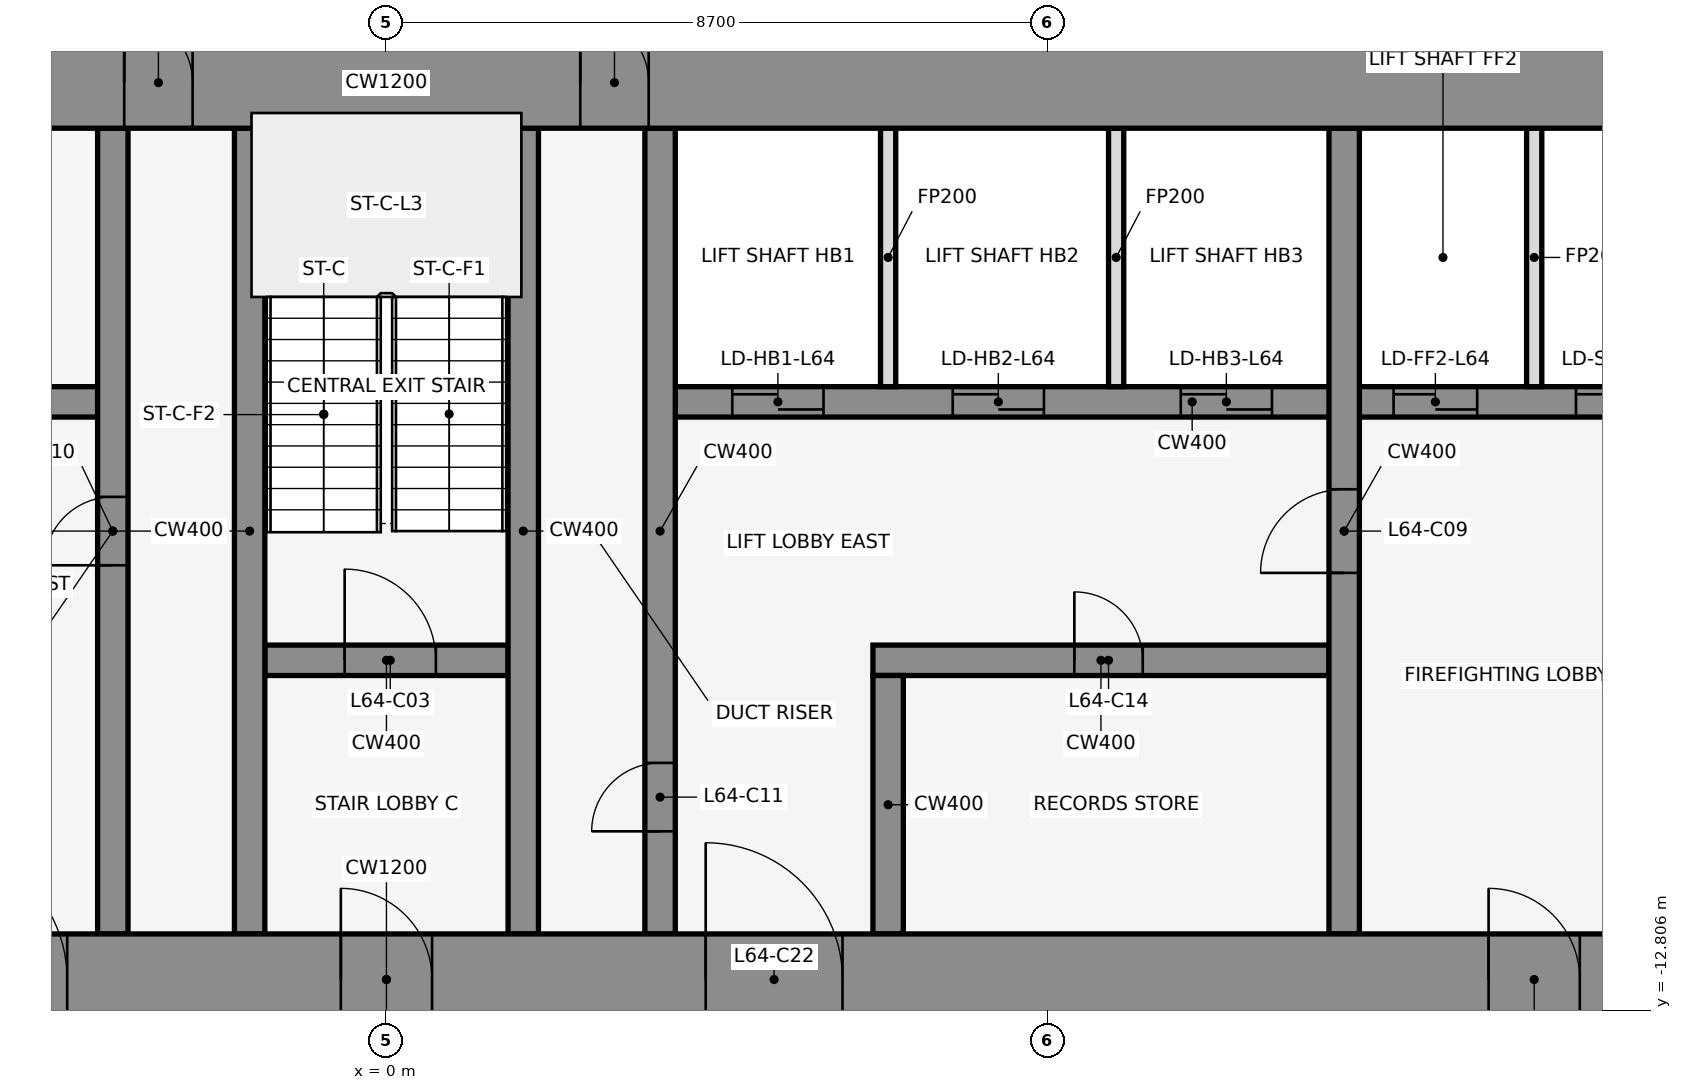
"""IFC4 building model, lengths in metres.
Left out: names, types, materials, properties, quantities, classifications, styles, units other than length and angle.
Written with IfcOpenShell. Run it as: python <this file> out.ifc"""

import sys

from ifc_helpers import new_model, si_unit, direction, frame, frame_2d, origin, place, context, subcontext, project, spatial, rectangle, extrude, element, fill, save


model = new_model("IFC4")
c1 = context("Model", 3, precision=1e-05, world=origin(), true_north=direction((0.0, 1.0)))
c2 = subcontext(c1, "Body", "Model", "MODEL_VIEW")
j1 = project(units=[si_unit("LENGTHUNIT", "METRE"), si_unit("PLANEANGLEUNIT", "RADIAN")], contexts=[c1])
p1 = place(None, origin())
s1 = spatial("IfcSite", under=j1, at=p1, CompositionType="ELEMENT")
p2 = place(p1, origin())
s2 = spatial("IfcBuilding", under=s1, at=p2, CompositionType="ELEMENT")
p3 = place(p2, frame((0.0, 0.0, 283.4)))
s3 = spatial("IfcBuildingStorey", under=s2, at=p3, CompositionType="ELEMENT", Elevation=283.4)
for number, where, z_axis, x_axis in (
    (1, (16.432, -0.105, 0.0), (0.0, 0.0, 1.0), (-0.84, 0.543, 0.0)),
    (2, (1.901, 1.08, 0.0), (0.0, 0.0, 1.0), (-0.84, -0.543, 0.0)),
    (3, (-0.068, -0.105, 0.0), (0.0, 0.0, 1.0), (-0.84, 0.543, 0.0)),
):
    element("IfcWall", number, at=place(p3, frame(where, z_axis=z_axis, x_axis=x_axis)), inside=s3, PredefinedType="STANDARD", context=c2, shape_type="SweptSolid", body=[
        extrude(rectangle(XDim=2.183, YDim=0.25, at=frame_2d((1.091, 0.0))), origin(), (0.0, 0.0, 1.0), 4.0),
    ])
p4 = place(p3, frame((-1.6, -8.2, 0.0), z_axis=(0.0, 0.0, 1.0), x_axis=(1.0, 0.0, 0.0)))
e4 = element("IfcWall", 4, at=p4, inside=s3, PredefinedType="SHEAR", context=c2, shape_type="SweptSolid", body=[
    extrude(rectangle(XDim=3.2, YDim=0.4, at=frame_2d((1.6, 0.0))), origin(), (0.0, 0.0, 1.0), 4.2),
])
p5 = place(p4, frame((1.05, 0.0, 0.0)))
e5 = element("IfcOpeningElement", 5, at=p5, cuts=e4, PredefinedType="OPENING", context=c2, shape_type="SweptSolid", body=[
    extrude(rectangle(XDim=1.2, YDim=2.1, at=frame_2d((0.6, 1.05))), frame((0.0, 0.212, 0.0), z_axis=(0.0, -1.0, 0.0), x_axis=(1.0, 0.0, 0.0)), (0.0, 0.0, 1.0), 0.424),
])
p6 = place(p3, frame((6.4, -8.2, 0.0), z_axis=(0.0, 0.0, 1.0), x_axis=(1.0, 0.0, 0.0)))
e6 = element("IfcWall", 6, at=p6, inside=s3, PredefinedType="SHEAR", context=c2, shape_type="SweptSolid", body=[
    extrude(rectangle(XDim=6.0, YDim=0.4, at=frame_2d((3.0, 0.0))), origin(), (0.0, 0.0, 1.0), 4.2),
])
p7 = place(p6, frame((2.65, 0.0, 0.0)))
e7 = element("IfcOpeningElement", 7, at=p7, cuts=e6, PredefinedType="OPENING", context=c2, shape_type="SweptSolid", body=[
    extrude(rectangle(XDim=0.9, YDim=2.1, at=frame_2d((0.45, 1.05))), frame((0.0, 0.212, 0.0), z_axis=(0.0, -1.0, 0.0), x_axis=(1.0, 0.0, 0.0)), (0.0, 0.0, 1.0), 0.424),
])
p8 = place(p3, frame((-17.4, -4.8, 0.0), z_axis=(0.0, 0.0, 1.0), x_axis=(1.0, 0.0, 0.0)))
e8 = element("IfcWall", 8, at=p8, inside=s3, PredefinedType="SHEAR", context=c2, shape_type="SweptSolid", body=[
    extrude(rectangle(XDim=13.6, YDim=0.4, at=frame_2d((6.8, 0.0))), origin(), (0.0, 0.0, 1.0), 4.2),
])
p9 = place(p8, frame((0.65, 0.0, 0.0)))
e9 = element("IfcOpeningElement", 9, at=p9, cuts=e8, PredefinedType="OPENING", context=c2, shape_type="SweptSolid", body=[
    extrude(rectangle(XDim=1.1, YDim=2.1, at=frame_2d((0.55, 1.05))), frame((0.0, 0.212, 0.0), z_axis=(0.0, -1.0, 0.0), x_axis=(1.0, 0.0, 0.0)), (0.0, 0.0, 1.0), 0.424),
])
p10 = place(p8, frame((2.95, 0.0, 0.0)))
e10 = element("IfcOpeningElement", 10, at=p10, cuts=e8, PredefinedType="OPENING", context=c2, shape_type="SweptSolid", body=[
    extrude(rectangle(XDim=1.1, YDim=2.1, at=frame_2d((0.55, 1.05))), frame((0.0, 0.212, 0.0), z_axis=(0.0, -1.0, 0.0), x_axis=(1.0, 0.0, 0.0)), (0.0, 0.0, 1.0), 0.424),
])
p11 = place(p8, frame((8.75, 0.0, 0.0)))
e11 = element("IfcOpeningElement", 11, at=p11, cuts=e8, PredefinedType="OPENING", context=c2, shape_type="SweptSolid", body=[
    extrude(rectangle(XDim=0.9, YDim=2.1, at=frame_2d((0.45, 1.05))), frame((0.0, 0.212, 0.0), z_axis=(0.0, -1.0, 0.0), x_axis=(1.0, 0.0, 0.0)), (0.0, 0.0, 1.0), 0.424),
])
p12 = place(p3, frame((3.8, -4.8, 0.0), z_axis=(0.0, 0.0, 1.0), x_axis=(1.0, 0.0, 0.0)))
e12 = element("IfcWall", 12, at=p12, inside=s3, PredefinedType="SHEAR", context=c2, shape_type="SweptSolid", body=[
    extrude(rectangle(XDim=13.6, YDim=0.4, at=frame_2d((6.8, 0.0))), origin(), (0.0, 0.0, 1.0), 4.2),
])
p13 = place(p12, frame((0.75, 0.0, 0.0)))
e13 = element("IfcOpeningElement", 13, at=p13, cuts=e12, PredefinedType="OPENING", context=c2, shape_type="SweptSolid", body=[
    extrude(rectangle(XDim=1.2, YDim=2.1, at=frame_2d((0.6, 1.05))), frame((0.0, 0.212, 0.0), z_axis=(0.0, -1.0, 0.0), x_axis=(1.0, 0.0, 0.0)), (0.0, 0.0, 1.0), 0.424),
])
p14 = place(p12, frame((3.65, 0.0, 0.0)))
e14 = element("IfcOpeningElement", 14, at=p14, cuts=e12, PredefinedType="OPENING", context=c2, shape_type="SweptSolid", body=[
    extrude(rectangle(XDim=1.2, YDim=2.1, at=frame_2d((0.6, 1.05))), frame((0.0, 0.212, 0.0), z_axis=(0.0, -1.0, 0.0), x_axis=(1.0, 0.0, 0.0)), (0.0, 0.0, 1.0), 0.424),
])
p15 = place(p12, frame((6.65, 0.0, 0.0)))
e15 = element("IfcOpeningElement", 15, at=p15, cuts=e12, PredefinedType="OPENING", context=c2, shape_type="SweptSolid", body=[
    extrude(rectangle(XDim=1.2, YDim=2.1, at=frame_2d((0.6, 1.05))), frame((0.0, 0.212, 0.0), z_axis=(0.0, -1.0, 0.0), x_axis=(1.0, 0.0, 0.0)), (0.0, 0.0, 1.0), 0.424),
])
p16 = place(p12, frame((9.45, 0.0, 0.0)))
e16 = element("IfcOpeningElement", 16, at=p16, cuts=e12, PredefinedType="OPENING", context=c2, shape_type="SweptSolid", body=[
    extrude(rectangle(XDim=1.1, YDim=2.1, at=frame_2d((0.55, 1.05))), frame((0.0, 0.212, 0.0), z_axis=(0.0, -1.0, 0.0), x_axis=(1.0, 0.0, 0.0)), (0.0, 0.0, 1.0), 0.424),
])
p17 = place(p12, frame((11.85, 0.0, 0.0)))
e17 = element("IfcOpeningElement", 17, at=p17, cuts=e12, PredefinedType="OPENING", context=c2, shape_type="SweptSolid", body=[
    extrude(rectangle(XDim=1.1, YDim=2.1, at=frame_2d((0.55, 1.05))), frame((0.0, 0.212, 0.0), z_axis=(0.0, -1.0, 0.0), x_axis=(1.0, 0.0, 0.0)), (0.0, 0.0, 1.0), 0.424),
])
p18 = place(p3, frame((-3.6, -11.8, 0.0), z_axis=(0.0, 0.0, 1.0), x_axis=(0.0, 1.0, 0.0)))
e18 = element("IfcWall", 18, at=p18, inside=s3, PredefinedType="SHEAR", context=c2, shape_type="SweptSolid", body=[
    extrude(rectangle(XDim=10.6, YDim=0.4, at=frame_2d((5.3, 0.0))), origin(), (0.0, 0.0, 1.0), 4.2),
])
p19 = place(p18, frame((4.85, 0.0, 0.0)))
e19 = element("IfcOpeningElement", 19, at=p19, cuts=e18, PredefinedType="OPENING", context=c2, shape_type="SweptSolid", body=[
    extrude(rectangle(XDim=0.9, YDim=2.1, at=frame_2d((0.45, 1.05))), frame((0.0, 0.212, 0.0), z_axis=(0.0, -1.0, 0.0), x_axis=(1.0, 0.0, 0.0)), (0.0, 0.0, 1.0), 0.424),
])
for number, where, z_axis, x_axis in (
    (20, (-1.8, -11.8, 0.0), (0.0, 0.0, 1.0), (0.0, 1.0, 0.0)),
    (21, (1.8, -11.8, 0.0), (0.0, 0.0, 1.0), (0.0, 1.0, 0.0)),
):
    element("IfcWall", number, at=place(p3, frame(where, z_axis=z_axis, x_axis=x_axis)), inside=s3, PredefinedType="SHEAR", context=c2, shape_type="SweptSolid", body=[
        extrude(rectangle(XDim=10.6, YDim=0.4, at=frame_2d((5.3, 0.0))), origin(), (0.0, 0.0, 1.0), 4.2),
    ])
p20 = place(p3, frame((3.6, -11.8, 0.0), z_axis=(0.0, 0.0, 1.0), x_axis=(0.0, 1.0, 0.0)))
e22 = element("IfcWall", 22, at=p20, inside=s3, PredefinedType="SHEAR", context=c2, shape_type="SweptSolid", body=[
    extrude(rectangle(XDim=10.6, YDim=0.4, at=frame_2d((5.3, 0.0))), origin(), (0.0, 0.0, 1.0), 4.2),
])
p21 = place(p20, frame((1.35, 0.0, 0.0)))
e23 = element("IfcOpeningElement", 23, at=p21, cuts=e22, PredefinedType="OPENING", context=c2, shape_type="SweptSolid", body=[
    extrude(rectangle(XDim=0.9, YDim=2.1, at=frame_2d((0.45, 1.05))), frame((0.0, 0.212, 0.0), z_axis=(0.0, -1.0, 0.0), x_axis=(1.0, 0.0, 0.0)), (0.0, 0.0, 1.0), 0.424),
])
p22 = place(p3, frame((6.6, -11.8, 0.0), z_axis=(0.0, 0.0, 1.0), x_axis=(0.0, 1.0, 0.0)))
e24 = element("IfcWall", 24, at=p22, inside=s3, PredefinedType="SHEAR", context=c2, shape_type="SweptSolid", body=[
    extrude(rectangle(XDim=3.4, YDim=0.4, at=frame_2d((1.7, 0.0))), origin(), (0.0, 0.0, 1.0), 4.2),
])
for number, where, z_axis, x_axis in (
    (25, (6.6, -4.6, 0.0), (0.0, 0.0, 1.0), (0.0, 1.0, 0.0)),
    (26, (9.6, -4.6, 0.0), (0.0, 0.0, 1.0), (0.0, 1.0, 0.0)),
):
    element("IfcWall", number, at=place(p3, frame(where, z_axis=z_axis, x_axis=x_axis)), inside=s3, PredefinedType="PARTITIONING", context=c2, shape_type="SweptSolid", body=[
        extrude(rectangle(XDim=3.4, YDim=0.2, at=frame_2d((1.7, 0.0))), origin(), (0.0, 0.0, 1.0), 3.068),
    ])
p23 = place(p3, frame((12.6, -11.8, 0.0), z_axis=(0.0, 0.0, 1.0), x_axis=(0.0, 1.0, 0.0)))
e27 = element("IfcWall", 27, at=p23, inside=s3, PredefinedType="SHEAR", context=c2, shape_type="SweptSolid", body=[
    extrude(rectangle(XDim=10.6, YDim=0.4, at=frame_2d((5.3, 0.0))), origin(), (0.0, 0.0, 1.0), 4.2),
])
p24 = place(p23, frame((4.75, 0.0, 0.0)))
e28 = element("IfcOpeningElement", 28, at=p24, cuts=e27, PredefinedType="OPENING", context=c2, shape_type="SweptSolid", body=[
    extrude(rectangle(XDim=1.1, YDim=2.1, at=frame_2d((0.55, 1.05))), frame((0.0, 0.212, 0.0), z_axis=(0.0, -1.0, 0.0), x_axis=(1.0, 0.0, 0.0)), (0.0, 0.0, 1.0), 0.424),
])
p25 = place(p3, frame((15.1, -4.6, 0.0), z_axis=(0.0, 0.0, 1.0), x_axis=(0.0, 1.0, 0.0)))
e29 = element("IfcWall", 29, at=p25, inside=s3, PredefinedType="PARTITIONING", context=c2, shape_type="SweptSolid", body=[
    extrude(rectangle(XDim=3.4, YDim=0.2, at=frame_2d((1.7, 0.0))), origin(), (0.0, 0.0, 1.0), 3.068),
])
p26 = place(p3, frame((-22.0, -0.6, 0.0), z_axis=(0.0, 0.0, 1.0), x_axis=(1.0, 0.0, 0.0)))
e30 = element("IfcWall", 30, at=p26, inside=s3, PredefinedType="SHEAR", context=c2, shape_type="SweptSolid", body=[
    extrude(rectangle(XDim=44.0, YDim=1.2, at=frame_2d((22.0, 0.0))), origin(), (0.0, 0.0, 1.0), 4.2),
])
p27 = place(p26, frame((18.55, 0.0, 0.0)))
e31 = element("IfcOpeningElement", 31, at=p27, cuts=e30, PredefinedType="OPENING", context=c2, shape_type="SweptSolid", body=[
    extrude(rectangle(XDim=0.9, YDim=2.1, at=frame_2d((0.45, 1.05))), frame((0.0, 0.612, 0.0), z_axis=(0.0, -1.0, 0.0), x_axis=(1.0, 0.0, 0.0)), (0.0, 0.0, 1.0), 1.224),
])
p28 = place(p26, frame((24.55, 0.0, 0.0)))
e32 = element("IfcOpeningElement", 32, at=p28, cuts=e30, PredefinedType="OPENING", context=c2, shape_type="SweptSolid", body=[
    extrude(rectangle(XDim=0.9, YDim=2.1, at=frame_2d((0.45, 1.05))), frame((0.0, 0.612, 0.0), z_axis=(0.0, -1.0, 0.0), x_axis=(1.0, 0.0, 0.0)), (0.0, 0.0, 1.0), 1.224),
])
p29 = place(p3, frame((-22.0, -12.4, 0.0), z_axis=(0.0, 0.0, 1.0), x_axis=(1.0, 0.0, 0.0)))
e33 = element("IfcWall", 33, at=p29, inside=s3, PredefinedType="SHEAR", context=c2, shape_type="SweptSolid", body=[
    extrude(rectangle(XDim=44.0, YDim=1.2, at=frame_2d((22.0, 0.0))), origin(), (0.0, 0.0, 1.0), 4.2),
])
p30 = place(p29, frame((2.2, 0.0, 0.0)))
e34 = element("IfcOpeningElement", 34, at=p30, cuts=e33, PredefinedType="OPENING", context=c2, shape_type="SweptSolid", body=[
    extrude(rectangle(XDim=1.2, YDim=2.1, at=frame_2d((0.6, 1.05))), frame((0.0, 0.612, 0.0), z_axis=(0.0, -1.0, 0.0), x_axis=(1.0, 0.0, 0.0)), (0.0, 0.0, 1.0), 1.224),
])
p31 = place(p29, frame((21.4, 0.0, 0.0)))
e35 = element("IfcOpeningElement", 35, at=p31, cuts=e33, PredefinedType="OPENING", context=c2, shape_type="SweptSolid", body=[
    extrude(rectangle(XDim=1.2, YDim=2.1, at=frame_2d((0.6, 1.05))), frame((0.0, 0.612, 0.0), z_axis=(0.0, -1.0, 0.0), x_axis=(1.0, 0.0, 0.0)), (0.0, 0.0, 1.0), 1.224),
])
p32 = place(p29, frame((40.6, 0.0, 0.0)))
e36 = element("IfcOpeningElement", 36, at=p32, cuts=e33, PredefinedType="OPENING", context=c2, shape_type="SweptSolid", body=[
    extrude(rectangle(XDim=1.2, YDim=2.1, at=frame_2d((0.6, 1.05))), frame((0.0, 0.612, 0.0), z_axis=(0.0, -1.0, 0.0), x_axis=(1.0, 0.0, 0.0)), (0.0, 0.0, 1.0), 1.224),
])
p33 = place(p29, frame((16.0, 0.0, 0.0)))
e37 = element("IfcOpeningElement", 37, at=p33, cuts=e33, PredefinedType="OPENING", context=c2, shape_type="SweptSolid", body=[
    extrude(rectangle(XDim=1.8, YDim=2.1, at=frame_2d((0.9, 1.05))), frame((0.0, 0.612, 0.0), z_axis=(0.0, -1.0, 0.0), x_axis=(1.0, 0.0, 0.0)), (0.0, 0.0, 1.0), 1.224),
])
p34 = place(p29, frame((6.3, 0.0, 0.0)))
e38 = element("IfcOpeningElement", 38, at=p34, cuts=e33, PredefinedType="OPENING", context=c2, shape_type="SweptSolid", body=[
    extrude(rectangle(XDim=1.2, YDim=2.1, at=frame_2d((0.6, 1.05))), frame((0.0, 0.612, 0.0), z_axis=(0.0, -1.0, 0.0), x_axis=(1.0, 0.0, 0.0)), (0.0, 0.0, 1.0), 1.224),
])
p35 = place(p29, frame((26.2, 0.0, 0.0)))
e39 = element("IfcOpeningElement", 39, at=p35, cuts=e33, PredefinedType="OPENING", context=c2, shape_type="SweptSolid", body=[
    extrude(rectangle(XDim=1.8, YDim=2.1, at=frame_2d((0.9, 1.05))), frame((0.0, 0.612, 0.0), z_axis=(0.0, -1.0, 0.0), x_axis=(1.0, 0.0, 0.0)), (0.0, 0.0, 1.0), 1.224),
])
p36 = place(p29, frame((36.5, 0.0, 0.0)))
e40 = element("IfcOpeningElement", 40, at=p36, cuts=e33, PredefinedType="OPENING", context=c2, shape_type="SweptSolid", body=[
    extrude(rectangle(XDim=1.2, YDim=2.1, at=frame_2d((0.6, 1.05))), frame((0.0, 0.612, 0.0), z_axis=(0.0, -1.0, 0.0), x_axis=(1.0, 0.0, 0.0)), (0.0, 0.0, 1.0), 1.224),
])
p37 = place(p5, origin())
e41 = element("IfcDoor", 41, at=p37, inside=s3, OperationType="SINGLE_SWING_LEFT", PredefinedType="DOOR", context=c2, shape_type="SweptSolid", body=[
    extrude(rectangle(XDim=1.2, YDim=2.1, at=frame_2d((0.6, 1.05))), frame((0.0, 0.025, 0.0), z_axis=(0.0, -1.0, 0.0), x_axis=(1.0, 0.0, 0.0)), (0.0, 0.0, 1.0), 0.05),
])
fill(e5, e41)
p38 = place(p13, origin())
e42 = element("IfcDoor", 42, at=p38, inside=s3, OperationType="DOUBLE_DOOR_SLIDING", PredefinedType="DOOR", context=c2, shape_type="SweptSolid", body=[
    extrude(rectangle(XDim=1.2, YDim=2.1, at=frame_2d((0.6, 1.05))), frame((0.0, 0.025, 0.0), z_axis=(0.0, -1.0, 0.0), x_axis=(1.0, 0.0, 0.0)), (0.0, 0.0, 1.0), 0.05),
])
fill(e13, e42)
p39 = place(p14, origin())
e43 = element("IfcDoor", 43, at=p39, inside=s3, OperationType="DOUBLE_DOOR_SLIDING", PredefinedType="DOOR", context=c2, shape_type="SweptSolid", body=[
    extrude(rectangle(XDim=1.2, YDim=2.1, at=frame_2d((0.6, 1.05))), frame((0.0, 0.025, 0.0), z_axis=(0.0, -1.0, 0.0), x_axis=(1.0, 0.0, 0.0)), (0.0, 0.0, 1.0), 0.05),
])
fill(e14, e43)
p40 = place(p15, origin())
e44 = element("IfcDoor", 44, at=p40, inside=s3, OperationType="DOUBLE_DOOR_SLIDING", PredefinedType="DOOR", context=c2, shape_type="SweptSolid", body=[
    extrude(rectangle(XDim=1.2, YDim=2.1, at=frame_2d((0.6, 1.05))), frame((0.0, 0.025, 0.0), z_axis=(0.0, -1.0, 0.0), x_axis=(1.0, 0.0, 0.0)), (0.0, 0.0, 1.0), 0.05),
])
fill(e15, e44)
p41 = place(p16, origin())
e45 = element("IfcDoor", 45, at=p41, inside=s3, OperationType="DOUBLE_DOOR_SLIDING", PredefinedType="DOOR", context=c2, shape_type="SweptSolid", body=[
    extrude(rectangle(XDim=1.1, YDim=2.1, at=frame_2d((0.55, 1.05))), frame((0.0, 0.025, 0.0), z_axis=(0.0, -1.0, 0.0), x_axis=(1.0, 0.0, 0.0)), (0.0, 0.0, 1.0), 0.05),
])
fill(e16, e45)
p42 = place(p17, origin())
e46 = element("IfcDoor", 46, at=p42, inside=s3, OperationType="DOUBLE_DOOR_SLIDING", PredefinedType="DOOR", context=c2, shape_type="SweptSolid", body=[
    extrude(rectangle(XDim=1.1, YDim=2.1, at=frame_2d((0.55, 1.05))), frame((0.0, 0.025, 0.0), z_axis=(0.0, -1.0, 0.0), x_axis=(1.0, 0.0, 0.0)), (0.0, 0.0, 1.0), 0.05),
])
fill(e17, e46)
p43 = place(p24, frame((1.1, 0.0, 0.0), z_axis=(0.0, 0.0, 1.0), x_axis=(-1.0, 0.0, 0.0)))
e47 = element("IfcDoor", 47, at=p43, inside=s3, OperationType="SINGLE_SWING_RIGHT", PredefinedType="DOOR", context=c2, shape_type="SweptSolid", body=[
    extrude(rectangle(XDim=1.1, YDim=2.1, at=frame_2d((0.55, 1.05))), frame((0.0, 0.025, 0.0), z_axis=(0.0, -1.0, 0.0), x_axis=(1.0, 0.0, 0.0)), (0.0, 0.0, 1.0), 0.05),
])
fill(e28, e47)
p44 = place(p19, frame((0.9, 0.0, 0.0), z_axis=(0.0, 0.0, 1.0), x_axis=(-1.0, 0.0, 0.0)))
e48 = element("IfcDoor", 48, at=p44, inside=s3, OperationType="SINGLE_SWING_LEFT", PredefinedType="DOOR", context=c2, shape_type="SweptSolid", body=[
    extrude(rectangle(XDim=0.9, YDim=2.1, at=frame_2d((0.45, 1.05))), frame((0.0, 0.025, 0.0), z_axis=(0.0, -1.0, 0.0), x_axis=(1.0, 0.0, 0.0)), (0.0, 0.0, 1.0), 0.05),
])
fill(e19, e48)
p45 = place(p21, origin())
e49 = element("IfcDoor", 49, at=p45, inside=s3, OperationType="SINGLE_SWING_LEFT", PredefinedType="DOOR", context=c2, shape_type="SweptSolid", body=[
    extrude(rectangle(XDim=0.9, YDim=2.1, at=frame_2d((0.45, 1.05))), frame((0.0, 0.025, 0.0), z_axis=(0.0, -1.0, 0.0), x_axis=(1.0, 0.0, 0.0)), (0.0, 0.0, 1.0), 0.05),
])
fill(e23, e49)
p46 = place(p7, frame((0.9, 0.0, 0.0), z_axis=(0.0, 0.0, 1.0), x_axis=(-1.0, 0.0, 0.0)))
e50 = element("IfcDoor", 50, at=p46, inside=s3, OperationType="SINGLE_SWING_LEFT", PredefinedType="DOOR", context=c2, shape_type="SweptSolid", body=[
    extrude(rectangle(XDim=0.9, YDim=2.1, at=frame_2d((0.45, 1.05))), frame((0.0, 0.025, 0.0), z_axis=(0.0, -1.0, 0.0), x_axis=(1.0, 0.0, 0.0)), (0.0, 0.0, 1.0), 0.05),
])
fill(e7, e50)
p47 = place(p27, origin())
e51 = element("IfcDoor", 51, at=p47, inside=s3, OperationType="SINGLE_SWING_LEFT", PredefinedType="DOOR", context=c2, shape_type="SweptSolid", body=[
    extrude(rectangle(XDim=0.9, YDim=2.1, at=frame_2d((0.45, 1.05))), frame((0.0, 0.025, 0.0), z_axis=(0.0, -1.0, 0.0), x_axis=(1.0, 0.0, 0.0)), (0.0, 0.0, 1.0), 0.05),
])
fill(e31, e51)
p48 = place(p28, origin())
e52 = element("IfcDoor", 52, at=p48, inside=s3, OperationType="SINGLE_SWING_LEFT", PredefinedType="DOOR", context=c2, shape_type="SweptSolid", body=[
    extrude(rectangle(XDim=0.9, YDim=2.1, at=frame_2d((0.45, 1.05))), frame((0.0, 0.025, 0.0), z_axis=(0.0, -1.0, 0.0), x_axis=(1.0, 0.0, 0.0)), (0.0, 0.0, 1.0), 0.05),
])
fill(e32, e52)
p49 = place(p31, frame((1.2, 0.0, 0.0), z_axis=(0.0, 0.0, 1.0), x_axis=(-1.0, 0.0, 0.0)))
e53 = element("IfcDoor", 53, at=p49, inside=s3, OperationType="SINGLE_SWING_RIGHT", PredefinedType="DOOR", context=c2, shape_type="SweptSolid", body=[
    extrude(rectangle(XDim=1.2, YDim=2.1, at=frame_2d((0.6, 1.05))), frame((0.0, 0.025, 0.0), z_axis=(0.0, -1.0, 0.0), x_axis=(1.0, 0.0, 0.0)), (0.0, 0.0, 1.0), 0.05),
])
fill(e35, e53)
p50 = place(p33, origin())
e54 = element("IfcDoor", 54, at=p50, inside=s3, OperationType="SINGLE_SWING_LEFT", PredefinedType="DOOR", context=c2, shape_type="SweptSolid", body=[
    extrude(rectangle(XDim=1.8, YDim=2.1, at=frame_2d((0.9, 1.05))), frame((0.0, 0.025, 0.0), z_axis=(0.0, -1.0, 0.0), x_axis=(1.0, 0.0, 0.0)), (0.0, 0.0, 1.0), 0.05),
])
fill(e37, e54)
p51 = place(p35, origin())
e55 = element("IfcDoor", 55, at=p51, inside=s3, OperationType="SINGLE_SWING_LEFT", PredefinedType="DOOR", context=c2, shape_type="SweptSolid", body=[
    extrude(rectangle(XDim=1.8, YDim=2.1, at=frame_2d((0.9, 1.05))), frame((0.0, 0.025, 0.0), z_axis=(0.0, -1.0, 0.0), x_axis=(1.0, 0.0, 0.0)), (0.0, 0.0, 1.0), 0.05),
])
fill(e39, e55)
p52 = place(p36, frame((1.2, 0.0, 0.0), z_axis=(0.0, 0.0, 1.0), x_axis=(-1.0, 0.0, 0.0)))
e56 = element("IfcDoor", 56, at=p52, inside=s3, OperationType="SINGLE_SWING_RIGHT", PredefinedType="DOOR", context=c2, shape_type="SweptSolid", body=[
    extrude(rectangle(XDim=1.2, YDim=2.1, at=frame_2d((0.6, 1.05))), frame((0.0, 0.025, 0.0), z_axis=(0.0, -1.0, 0.0), x_axis=(1.0, 0.0, 0.0)), (0.0, 0.0, 1.0), 0.05),
])
fill(e40, e56)
save(model, sys.argv[1])
